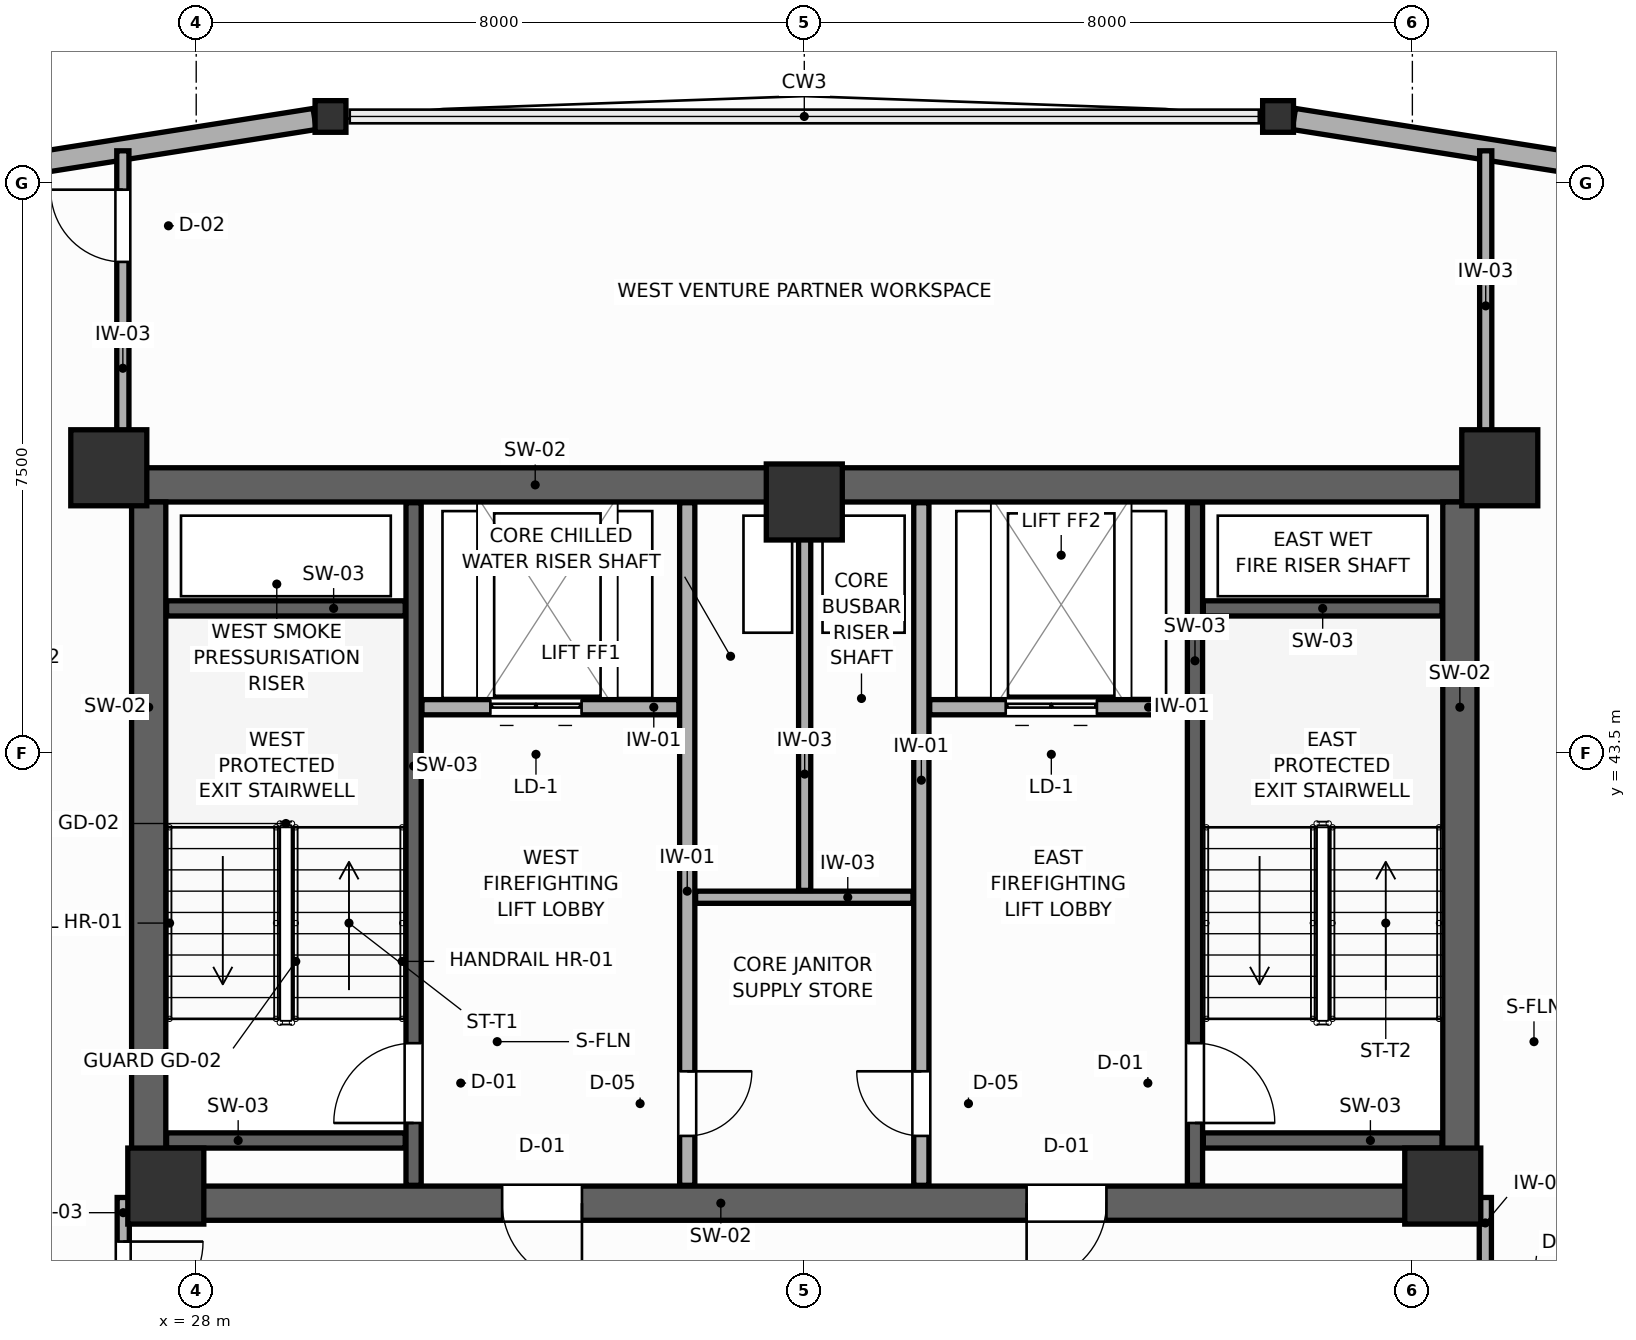
"""IFC4 building model, lengths in metres.
Left out: names, types, materials, properties, quantities, classifications, styles, units other than length and angle.
Written with IfcOpenShell. Run it as: python <this file> out.ifc"""

import sys

from ifc_helpers import new_model, si_unit, direction, frame, frame_2d, origin, origin_2d, place, context, subcontext, project, spatial, rectangle, i_section, extrude, source, transform, mapped, element, fill, save


model = new_model("IFC4")
c1 = context("Model", 3, precision=1e-05, world=origin(), true_north=direction((0.0, 1.0)))
c2 = subcontext(c1, "Body", "Model", "MODEL_VIEW")
j1 = project(units=[si_unit("LENGTHUNIT", "METRE"), si_unit("PLANEANGLEUNIT", "RADIAN")], contexts=[c1])
p1 = place(None, origin())
s1 = spatial("IfcSite", under=j1, at=p1, CompositionType="ELEMENT")
p2 = place(p1, origin())
s2 = spatial("IfcBuilding", under=s1, at=p2, CompositionType="ELEMENT")
p3 = place(p2, frame((0.0, 0.0, 197.4)))
s3 = spatial("IfcBuildingStorey", under=s2, at=p3, CompositionType="ELEMENT", Elevation=197.4)
p4 = place(p3, frame((27.15, 47.025, 0.0), z_axis=(0.0, 0.0, 1.0), x_axis=(1.0, 0.0, 0.0)))
e1 = element("IfcWall", 1, at=p4, inside=s3, PredefinedType="SHEAR", context=c2, shape_type="SweptSolid", body=[
    extrude(rectangle(XDim=17.7, YDim=0.45, at=frame_2d((8.85, 0.0))), origin(), (0.0, 0.0, 1.0), 3.6),
])
p5 = place(p3, frame((27.15, 37.575, 0.0), z_axis=(0.0, 0.0, 1.0), x_axis=(1.0, 0.0, 0.0)))
e2 = element("IfcWall", 2, at=p5, inside=s3, PredefinedType="SHEAR", context=c2, shape_type="SweptSolid", body=[
    extrude(rectangle(XDim=17.7, YDim=0.45, at=frame_2d((8.85, 0.0))), origin(), (0.0, 0.0, 1.0), 3.6),
])
p6 = place(p5, frame((4.875, 0.0, 0.0)))
e3 = element("IfcOpeningElement", 3, at=p6, cuts=e2, PredefinedType="OPENING", context=c2, shape_type="SweptSolid", body=[
    extrude(rectangle(XDim=1.05, YDim=2.1, at=frame_2d((0.525, 1.05))), frame((0.0, 0.235, 0.0), z_axis=(0.0, -1.0, 0.0), x_axis=(1.0, 0.0, 0.0)), (0.0, 0.0, 1.0), 0.47),
])
p7 = place(p5, frame((11.775, 0.0, 0.0)))
e4 = element("IfcOpeningElement", 4, at=p7, cuts=e2, PredefinedType="OPENING", context=c2, shape_type="SweptSolid", body=[
    extrude(rectangle(XDim=1.05, YDim=2.1, at=frame_2d((0.525, 1.05))), frame((0.0, 0.235, 0.0), z_axis=(0.0, -1.0, 0.0), x_axis=(1.0, 0.0, 0.0)), (0.0, 0.0, 1.0), 0.47),
])
for number, where, z_axis, x_axis in (
    (5, (27.375, 37.8, 0.0), (0.0, 0.0, 1.0), (0.0, 1.0, 0.0)),
    (6, (44.625, 37.8, 0.0), (0.0, 0.0, 1.0), (0.0, 1.0, 0.0)),
):
    element("IfcWall", number, at=place(p3, frame(where, z_axis=z_axis, x_axis=x_axis)), inside=s3, PredefinedType="SHEAR", context=c2, shape_type="SweptSolid", body=[
        extrude(rectangle(XDim=9.0, YDim=0.45, at=frame_2d((4.5, 0.0))), origin(), (0.0, 0.0, 1.0), 3.6),
    ])
m1 = source(origin(), c2, "Body", "SweptSolid", [
    extrude(rectangle(XDim=1.0, YDim=1.0, at=origin_2d()), origin(), (0.0, 0.0, 1.0), 3.6),
])
for number, where, z_axis, x_axis in (
    (7, (26.85, 47.25, 0.0), (0.0, 0.0, 1.0), (1.0, 0.0, 0.0)),
    (8, (45.15, 47.25, 0.0), (0.0, 0.0, 1.0), (1.0, 0.0, 0.0)),
    (9, (27.6, 37.8, 0.0), (0.0, 0.0, 1.0), (1.0, 0.0, 0.0)),
    (10, (44.4, 37.8, 0.0), (0.0, 0.0, 1.0), (1.0, 0.0, 0.0)),
    (11, (36.0, 46.8, 0.0), (0.0, 0.0, 1.0), (1.0, 0.0, 0.0)),
):
    element("IfcColumn", number, at=place(p3, frame(where, z_axis=z_axis, x_axis=x_axis)), inside=s3, PredefinedType="COLUMN", context=c2, shape_type="MappedRepresentation", body=[
        mapped(m1, transform((0.0, 0.0, 0.0), scale=1.0)),
    ])
m2 = source(origin(), c2, "Body", "SweptSolid", [
    extrude(i_section(OverallWidth=0.406, OverallDepth=0.416, WebThickness=0.027, FlangeThickness=0.044, FilletRadius=0.015, at=origin_2d()), origin(), (0.0, 0.0, 1.0), 3.6),
])
for number, where, z_axis, x_axis in (
    (12, (42.233, 51.872, 0.0), (0.0, 0.0, 1.0), (1.0, 0.0, 0.0)),
    (13, (29.767, 51.872, 0.0), (0.0, 0.0, 1.0), (1.0, 0.0, 0.0)),
):
    element("IfcColumn", number, at=place(p3, frame(where, z_axis=z_axis, x_axis=x_axis)), inside=s3, PredefinedType="COLUMN", context=c2, shape_type="MappedRepresentation", body=[
        mapped(m2, transform((0.0, 0.0, 0.0), scale=1.0)),
    ])
p8 = place(p3, frame((56.258, 49.656, 0.0), z_axis=(0.0, 0.0, 1.0), x_axis=(-0.987743003355, 0.15608894683, 0.0)))
e14 = element("IfcWall", 14, at=p8, inside=s3, PredefinedType="SOLIDWALL", context=c2, shape_type="SweptSolid", body=[
    extrude(rectangle(XDim=13.988, YDim=0.28, at=frame_2d((6.994, 0.0))), origin(), (0.0, 0.0, 1.0), 2.87),
])
p9 = place(p3, frame((29.559, 51.839, 0.0), z_axis=(0.0, 0.0, 1.0), x_axis=(-0.987743003355, -0.15608894683, 0.0)))
e15 = element("IfcWall", 15, at=p9, inside=s3, PredefinedType="SOLIDWALL", context=c2, shape_type="SweptSolid", body=[
    extrude(rectangle(XDim=13.988, YDim=0.28, at=frame_2d((6.994, 0.0))), origin(), (0.0, 0.0, 1.0), 2.81),
])
p10 = place(p3, frame((30.86, 37.81, 0.0), z_axis=(0.0, 0.0, 1.0), x_axis=(0.0, 1.0, 0.0)))
e16 = element("IfcWall", 16, at=p10, inside=s3, PredefinedType="SHEAR", context=c2, shape_type="SweptSolid", body=[
    extrude(rectangle(XDim=8.98, YDim=0.2, at=frame_2d((4.49, 0.0))), origin(), (0.0, 0.0, 1.0), 3.6),
])
p11 = place(p10, frame((0.82, 0.0, 0.0)))
e17 = element("IfcOpeningElement", 17, at=p11, cuts=e16, PredefinedType="OPENING", context=c2, shape_type="SweptSolid", body=[
    extrude(rectangle(XDim=1.05, YDim=2.1, at=frame_2d((0.525, 1.05))), frame((0.0, 0.11, 0.0), z_axis=(0.0, -1.0, 0.0), x_axis=(1.0, 0.0, 0.0)), (0.0, 0.0, 1.0), 0.22),
])
for number, where, z_axis, x_axis in (
    (18, (27.61, 45.4, 0.0), (0.0, 0.0, 1.0), (1.0, 0.0, 0.0)),
    (19, (27.61, 38.4, 0.0), (0.0, 0.0, 1.0), (1.0, 0.0, 0.0)),
):
    element("IfcWall", number, at=place(p3, frame(where, z_axis=z_axis, x_axis=x_axis)), inside=s3, PredefinedType="SHEAR", context=c2, shape_type="SweptSolid", body=[
        extrude(rectangle(XDim=3.14, YDim=0.2, at=frame_2d((1.57, 0.0))), origin(), (0.0, 0.0, 1.0), 3.6),
    ])
p12 = place(p3, frame((41.14, 37.81, 0.0), z_axis=(0.0, 0.0, 1.0), x_axis=(0.0, 1.0, 0.0)))
e20 = element("IfcWall", 20, at=p12, inside=s3, PredefinedType="SHEAR", context=c2, shape_type="SweptSolid", body=[
    extrude(rectangle(XDim=8.98, YDim=0.2, at=frame_2d((4.49, 0.0))), origin(), (0.0, 0.0, 1.0), 3.6),
])
p13 = place(p12, frame((0.82, 0.0, 0.0)))
e21 = element("IfcOpeningElement", 21, at=p13, cuts=e20, PredefinedType="OPENING", context=c2, shape_type="SweptSolid", body=[
    extrude(rectangle(XDim=1.05, YDim=2.1, at=frame_2d((0.525, 1.05))), frame((0.0, 0.11, 0.0), z_axis=(0.0, -1.0, 0.0), x_axis=(1.0, 0.0, 0.0)), (0.0, 0.0, 1.0), 0.22),
])
for number, where, z_axis, x_axis in (
    (22, (41.25, 45.4, 0.0), (0.0, 0.0, 1.0), (1.0, 0.0, 0.0)),
    (23, (41.25, 38.4, 0.0), (0.0, 0.0, 1.0), (1.0, 0.0, 0.0)),
):
    element("IfcWall", number, at=place(p3, frame(where, z_axis=z_axis, x_axis=x_axis)), inside=s3, PredefinedType="SHEAR", context=c2, shape_type="SweptSolid", body=[
        extrude(rectangle(XDim=3.14, YDim=0.2, at=frame_2d((1.57, 0.0))), origin(), (0.0, 0.0, 1.0), 3.6),
    ])
p14 = place(p3, frame((30.97, 44.1, 0.0), z_axis=(0.0, 0.0, 1.0), x_axis=(1.0, 0.0, 0.0)))
e24 = element("IfcWall", 24, at=p14, inside=s3, PredefinedType="PARTITIONING", context=c2, shape_type="SweptSolid", body=[
    extrude(rectangle(XDim=3.38, YDim=0.2, at=frame_2d((1.69, 0.0))), origin(), (0.0, 0.0, 1.0), 3.26),
])
p15 = place(p14, frame((0.9, 0.0, 0.0)))
e25 = element("IfcOpeningElement", 25, at=p15, cuts=e24, PredefinedType="OPENING", context=c2, shape_type="SweptSolid", body=[
    extrude(rectangle(XDim=1.2, YDim=2.1, at=frame_2d((0.6, 1.05))), frame((0.0, 0.11, 0.0), z_axis=(0.0, -1.0, 0.0), x_axis=(1.0, 0.0, 0.0)), (0.0, 0.0, 1.0), 0.22),
])
p16 = place(p3, frame((37.65, 44.1, 0.0), z_axis=(0.0, 0.0, 1.0), x_axis=(1.0, 0.0, 0.0)))
e26 = element("IfcWall", 26, at=p16, inside=s3, PredefinedType="PARTITIONING", context=c2, shape_type="SweptSolid", body=[
    extrude(rectangle(XDim=3.38, YDim=0.2, at=frame_2d((1.69, 0.0))), origin(), (0.0, 0.0, 1.0), 3.26),
])
p17 = place(p16, frame((1.0, 0.0, 0.0)))
e27 = element("IfcOpeningElement", 27, at=p17, cuts=e26, PredefinedType="OPENING", context=c2, shape_type="SweptSolid", body=[
    extrude(rectangle(XDim=1.2, YDim=2.1, at=frame_2d((0.6, 1.05))), frame((0.0, 0.11, 0.0), z_axis=(0.0, -1.0, 0.0), x_axis=(1.0, 0.0, 0.0)), (0.0, 0.0, 1.0), 0.22),
])
p18 = place(p3, frame((34.46, 37.81, 0.0), z_axis=(0.0, 0.0, 1.0), x_axis=(0.0, 1.0, 0.0)))
e28 = element("IfcWall", 28, at=p18, inside=s3, PredefinedType="PARTITIONING", context=c2, shape_type="SweptSolid", body=[
    extrude(rectangle(XDim=8.98, YDim=0.2, at=frame_2d((4.49, 0.0))), origin(), (0.0, 0.0, 1.0), 3.26),
])
p19 = place(p18, frame((0.65, 0.0, 0.0)))
e29 = element("IfcOpeningElement", 29, at=p19, cuts=e28, PredefinedType="OPENING", context=c2, shape_type="SweptSolid", body=[
    extrude(rectangle(XDim=0.85, YDim=2.05, at=frame_2d((0.425, 1.025))), frame((0.0, 0.11, 0.0), z_axis=(0.0, -1.0, 0.0), x_axis=(1.0, 0.0, 0.0)), (0.0, 0.0, 1.0), 0.22),
])
p20 = place(p3, frame((37.54, 37.81, 0.0), z_axis=(0.0, 0.0, 1.0), x_axis=(0.0, 1.0, 0.0)))
e30 = element("IfcWall", 30, at=p20, inside=s3, PredefinedType="PARTITIONING", context=c2, shape_type="SweptSolid", body=[
    extrude(rectangle(XDim=8.98, YDim=0.2, at=frame_2d((4.49, 0.0))), origin(), (0.0, 0.0, 1.0), 3.26),
])
p21 = place(p20, frame((0.65, 0.0, 0.0)))
e31 = element("IfcOpeningElement", 31, at=p21, cuts=e30, PredefinedType="OPENING", context=c2, shape_type="SweptSolid", body=[
    extrude(rectangle(XDim=0.85, YDim=2.05, at=frame_2d((0.425, 1.025))), frame((0.0, 0.11, 0.0), z_axis=(0.0, -1.0, 0.0), x_axis=(1.0, 0.0, 0.0)), (0.0, 0.0, 1.0), 0.22),
])
p22 = place(p3, frame((34.57, 41.6, 0.0), z_axis=(0.0, 0.0, 1.0), x_axis=(1.0, 0.0, 0.0)))
e32 = element("IfcWall", 32, at=p22, inside=s3, PredefinedType="PARTITIONING", context=c2, shape_type="SweptSolid", body=[
    extrude(rectangle(XDim=2.86, YDim=0.16, at=frame_2d((1.43, 0.0))), origin(), (0.0, 0.0, 1.0), 3.26),
])
p23 = place(p3, frame((36.005, 41.69, 0.0), z_axis=(0.0, 0.0, 1.0), x_axis=(0.0, 1.0, 0.0)))
e33 = element("IfcWall", 33, at=p23, inside=s3, PredefinedType="PARTITIONING", context=c2, shape_type="SweptSolid", body=[
    extrude(rectangle(XDim=5.1, YDim=0.16, at=frame_2d((2.55, 0.0))), origin(), (0.0, 0.0, 1.0), 3.26),
])
p24 = place(p3, frame((27.04, 35.54, 0.0), z_axis=(0.0, 0.0, 1.0), x_axis=(0.0, 1.0, 0.0)))
e34 = element("IfcWall", 34, at=p24, inside=s3, PredefinedType="PARTITIONING", context=c2, shape_type="SweptSolid", body=[
    extrude(rectangle(XDim=2.11, YDim=0.16, at=frame_2d((1.055, 0.0))), origin(), (0.0, 0.0, 1.0), 3.26),
])
p25 = place(p24, frame((0.48, 0.0, 0.0)))
e35 = element("IfcOpeningElement", 35, at=p25, cuts=e34, PredefinedType="OPENING", context=c2, shape_type="SweptSolid", body=[
    extrude(rectangle(XDim=1.05, YDim=2.1, at=frame_2d((0.525, 1.05))), frame((0.0, 0.09, 0.0), z_axis=(0.0, -1.0, 0.0), x_axis=(1.0, 0.0, 0.0)), (0.0, 0.0, 1.0), 0.18),
])
p26 = place(p3, frame((44.96, 35.0, 0.0), z_axis=(0.0, 0.0, 1.0), x_axis=(0.0, 1.0, 0.0)))
e36 = element("IfcWall", 36, at=p26, inside=s3, PredefinedType="PARTITIONING", context=c2, shape_type="SweptSolid", body=[
    extrude(rectangle(XDim=2.65, YDim=0.16, at=frame_2d((1.325, 0.0))), origin(), (0.0, 0.0, 1.0), 3.26),
])
p27 = place(p26, frame((0.75, 0.0, 0.0)))
e37 = element("IfcOpeningElement", 37, at=p27, cuts=e36, PredefinedType="OPENING", context=c2, shape_type="SweptSolid", body=[
    extrude(rectangle(XDim=1.05, YDim=2.1, at=frame_2d((0.525, 1.05))), frame((0.0, 0.09, 0.0), z_axis=(0.0, -1.0, 0.0), x_axis=(1.0, 0.0, 0.0)), (0.0, 0.0, 1.0), 0.18),
])
p28 = place(p3, frame((27.035, 47.34, 0.0), z_axis=(0.0, 0.0, 1.0), x_axis=(0.0, 1.0, 0.0)))
e38 = element("IfcWall", 38, at=p28, inside=s3, PredefinedType="PARTITIONING", context=c2, shape_type="SweptSolid", body=[
    extrude(rectangle(XDim=4.08, YDim=0.16, at=frame_2d((2.04, 0.0))), origin(), (0.0, 0.0, 1.0), 3.26),
])
p29 = place(p28, frame((2.618, 0.0, 0.0)))
e39 = element("IfcOpeningElement", 39, at=p29, cuts=e38, PredefinedType="OPENING", context=c2, shape_type="SweptSolid", body=[
    extrude(rectangle(XDim=0.95, YDim=2.05, at=frame_2d((0.475, 1.025))), frame((0.0, 0.09, 0.0), z_axis=(0.0, -1.0, 0.0), x_axis=(1.0, 0.0, 0.0)), (0.0, 0.0, 1.0), 0.18),
])
p30 = place(p3, frame((44.965, 47.34, 0.0), z_axis=(0.0, 0.0, 1.0), x_axis=(0.0, 1.0, 0.0)))
e40 = element("IfcWall", 40, at=p30, inside=s3, PredefinedType="PARTITIONING", context=c2, shape_type="SweptSolid", body=[
    extrude(rectangle(XDim=4.08, YDim=0.16, at=frame_2d((2.04, 0.0))), origin(), (0.0, 0.0, 1.0), 3.26),
])
p31 = place(p11, origin())
e41 = element("IfcDoor", 41, at=p31, inside=s3, OperationType="SINGLE_SWING_LEFT", PredefinedType="DOOR", context=c2, shape_type="SweptSolid", body=[
    extrude(rectangle(XDim=1.05, YDim=2.1, at=frame_2d((0.525, 1.05))), frame((0.0, 0.025, 0.0), z_axis=(0.0, -1.0, 0.0), x_axis=(1.0, 0.0, 0.0)), (0.0, 0.0, 1.0), 0.05),
])
fill(e17, e41)
p32 = place(p13, frame((1.05, 0.0, 0.0), z_axis=(0.0, 0.0, 1.0), x_axis=(-1.0, 0.0, 0.0)))
e42 = element("IfcDoor", 42, at=p32, inside=s3, OperationType="SINGLE_SWING_RIGHT", PredefinedType="DOOR", context=c2, shape_type="SweptSolid", body=[
    extrude(rectangle(XDim=1.05, YDim=2.1, at=frame_2d((0.525, 1.05))), frame((0.0, 0.025, 0.0), z_axis=(0.0, -1.0, 0.0), x_axis=(1.0, 0.0, 0.0)), (0.0, 0.0, 1.0), 0.05),
])
fill(e21, e42)
p33 = place(p15, origin())
e43 = element("IfcDoor", 43, at=p33, inside=s3, OperationType="DOUBLE_DOOR_SLIDING", PredefinedType="DOOR", context=c2, shape_type="SweptSolid", body=[
    extrude(rectangle(XDim=1.2, YDim=2.1, at=frame_2d((0.6, 1.05))), frame((0.0, 0.025, 0.0), z_axis=(0.0, -1.0, 0.0), x_axis=(1.0, 0.0, 0.0)), (0.0, 0.0, 1.0), 0.05),
])
fill(e25, e43)
p34 = place(p17, origin())
e44 = element("IfcDoor", 44, at=p34, inside=s3, OperationType="DOUBLE_DOOR_SLIDING", PredefinedType="DOOR", context=c2, shape_type="SweptSolid", body=[
    extrude(rectangle(XDim=1.2, YDim=2.1, at=frame_2d((0.6, 1.05))), frame((0.0, 0.025, 0.0), z_axis=(0.0, -1.0, 0.0), x_axis=(1.0, 0.0, 0.0)), (0.0, 0.0, 1.0), 0.05),
])
fill(e27, e44)
p35 = place(p19, frame((0.85, 0.0, 0.0), z_axis=(0.0, 0.0, 1.0), x_axis=(-1.0, 0.0, 0.0)))
e45 = element("IfcDoor", 45, at=p35, inside=s3, OperationType="SINGLE_SWING_LEFT", PredefinedType="DOOR", context=c2, shape_type="SweptSolid", body=[
    extrude(rectangle(XDim=0.85, YDim=2.05, at=frame_2d((0.425, 1.025))), frame((0.0, 0.025, 0.0), z_axis=(0.0, -1.0, 0.0), x_axis=(1.0, 0.0, 0.0)), (0.0, 0.0, 1.0), 0.05),
])
fill(e29, e45)
p36 = place(p21, origin())
e46 = element("IfcDoor", 46, at=p36, inside=s3, OperationType="SINGLE_SWING_RIGHT", PredefinedType="DOOR", context=c2, shape_type="SweptSolid", body=[
    extrude(rectangle(XDim=0.85, YDim=2.05, at=frame_2d((0.425, 1.025))), frame((0.0, 0.025, 0.0), z_axis=(0.0, -1.0, 0.0), x_axis=(1.0, 0.0, 0.0)), (0.0, 0.0, 1.0), 0.05),
])
fill(e31, e46)
p37 = place(p25, frame((1.05, 0.0, 0.0), z_axis=(0.0, 0.0, 1.0), x_axis=(-1.0, 0.0, 0.0)))
e47 = element("IfcDoor", 47, at=p37, inside=s3, OperationType="SINGLE_SWING_LEFT", PredefinedType="DOOR", context=c2, shape_type="SweptSolid", body=[
    extrude(rectangle(XDim=1.05, YDim=2.1, at=frame_2d((0.525, 1.05))), frame((0.0, 0.025, 0.0), z_axis=(0.0, -1.0, 0.0), x_axis=(1.0, 0.0, 0.0)), (0.0, 0.0, 1.0), 0.05),
])
fill(e35, e47)
p38 = place(p29, origin())
e48 = element("IfcDoor", 48, at=p38, inside=s3, OperationType="SINGLE_SWING_RIGHT", PredefinedType="DOOR", context=c2, shape_type="SweptSolid", body=[
    extrude(rectangle(XDim=0.95, YDim=2.05, at=frame_2d((0.475, 1.025))), frame((0.0, 0.025, 0.0), z_axis=(0.0, -1.0, 0.0), x_axis=(1.0, 0.0, 0.0)), (0.0, 0.0, 1.0), 0.05),
])
fill(e39, e48)
p39 = place(p6, frame((1.05, 0.0, 0.0), z_axis=(0.0, 0.0, 1.0), x_axis=(-1.0, 0.0, 0.0)))
e49 = element("IfcDoor", 49, at=p39, inside=s3, OperationType="SINGLE_SWING_LEFT", PredefinedType="DOOR", context=c2, shape_type="SweptSolid", body=[
    extrude(rectangle(XDim=1.05, YDim=2.1, at=frame_2d((0.525, 1.05))), frame((0.0, 0.025, 0.0), z_axis=(0.0, -1.0, 0.0), x_axis=(1.0, 0.0, 0.0)), (0.0, 0.0, 1.0), 0.05),
])
fill(e3, e49)
p40 = place(p7, frame((1.05, 0.0, 0.0), z_axis=(0.0, 0.0, 1.0), x_axis=(-1.0, 0.0, 0.0)))
e50 = element("IfcDoor", 50, at=p40, inside=s3, OperationType="SINGLE_SWING_RIGHT", PredefinedType="DOOR", context=c2, shape_type="SweptSolid", body=[
    extrude(rectangle(XDim=1.05, YDim=2.1, at=frame_2d((0.525, 1.05))), frame((0.0, 0.025, 0.0), z_axis=(0.0, -1.0, 0.0), x_axis=(1.0, 0.0, 0.0)), (0.0, 0.0, 1.0), 0.05),
])
fill(e4, e50)
save(model, sys.argv[1])
